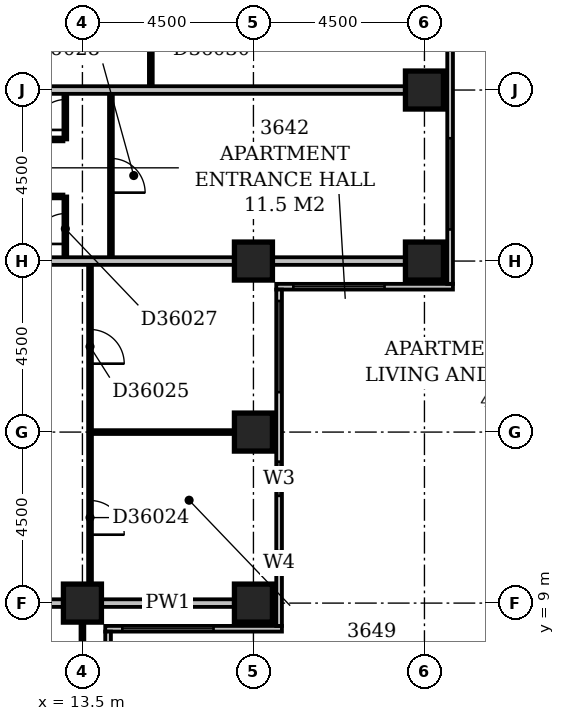
"""IFC4 building model, lengths in metres.
Left out: names, types, materials, properties, quantities, classifications, styles, units other than length and angle.
Written with IfcOpenShell. Run it as: python <this file> out.ifc"""

import sys

from ifc_helpers import new_model, si_unit, direction, frame, frame_2d, origin, origin_2d, place, context, subcontext, project, spatial, rectangle, extrude, element, fill, save


model = new_model("IFC4")
c1 = context("Model", 3, precision=1e-05, world=origin(), true_north=direction((0.0, 1.0)))
c2 = subcontext(c1, "Body", "Model", "MODEL_VIEW")
j1 = project(units=[si_unit("LENGTHUNIT", "METRE"), si_unit("PLANEANGLEUNIT", "RADIAN")], contexts=[c1])
p1 = place(None, origin())
s1 = spatial("IfcSite", under=j1, at=p1, CompositionType="ELEMENT")
p2 = place(p1, origin())
s2 = spatial("IfcBuilding", under=s1, at=p2, CompositionType="ELEMENT")
p3 = place(p2, frame((0.0, 0.0, 144.8)))
s3 = spatial("IfcBuildingStorey", under=s2, at=p3, CompositionType="ELEMENT", Elevation=144.8)
for number, where, z_axis, x_axis in (
    (1, (13.5, 9.0, -0.3), (0.0, 0.0, 1.0), (1.0, 0.0, 0.0)),
    (2, (18.0, 9.0, -0.3), (0.0, 0.0, 1.0), (1.0, 0.0, 0.0)),
    (3, (18.0, 13.5, -0.3), (0.0, 0.0, 1.0), (1.0, 0.0, 0.0)),
    (4, (18.0, 18.0, -0.3), (0.0, 0.0, 1.0), (1.0, 0.0, 0.0)),
    (5, (22.5, 18.0, -0.3), (0.0, 0.0, 1.0), (1.0, 0.0, 0.0)),
    (6, (22.5, 22.5, -0.3), (0.0, 0.0, 1.0), (1.0, 0.0, 0.0)),
):
    element("IfcColumn", number, at=place(p3, frame(where, z_axis=z_axis, x_axis=x_axis)), inside=s3, PredefinedType="COLUMN", context=c2, shape_type="SweptSolid", body=[
        extrude(rectangle(XDim=1.0, YDim=1.0, at=origin_2d()), origin(), (0.0, 0.0, 1.0), 3.6),
    ])
p4 = place(p3, frame((14.175, 3.9, 0.0), z_axis=(0.0, 0.0, 1.0), x_axis=(0.0, 1.0, 0.0)))
e7 = element("IfcWall", 7, at=p4, inside=s3, PredefinedType="STANDARD", context=c2, shape_type="SweptSolid", body=[
    extrude(rectangle(XDim=4.35, YDim=0.15, at=frame_2d((2.175, 0.0))), origin(), (0.0, 0.0, 1.0), 2.7),
])
p5 = place(p4, frame((1.65, 0.0, 0.6)))
e8 = element("IfcOpeningElement", 8, at=p5, cuts=e7, PredefinedType="OPENING", context=c2, shape_type="SweptSolid", body=[
    extrude(rectangle(XDim=2.4, YDim=1.8, at=frame_2d((1.2, 0.9))), frame((0.0, 0.087, 0.0), z_axis=(0.0, -1.0, 0.0), x_axis=(1.0, 0.0, 0.0)), (0.0, 0.0, 1.0), 0.174),
])
p6 = place(p3, frame((14.1, 8.325, 0.0), z_axis=(0.0, 0.0, 1.0), x_axis=(1.0, 0.0, 0.0)))
e9 = element("IfcWall", 9, at=p6, inside=s3, PredefinedType="STANDARD", context=c2, shape_type="SweptSolid", body=[
    extrude(rectangle(XDim=4.65, YDim=0.15, at=frame_2d((2.325, 0.0))), origin(), (0.0, 0.0, 1.0), 2.7),
])
p7 = place(p6, frame((0.45, 0.0, 0.6)))
e10 = element("IfcOpeningElement", 10, at=p7, cuts=e9, PredefinedType="OPENING", context=c2, shape_type="SweptSolid", body=[
    extrude(rectangle(XDim=2.4, YDim=1.8, at=frame_2d((1.2, 0.9))), frame((0.0, 0.087, 0.0), z_axis=(0.0, -1.0, 0.0), x_axis=(1.0, 0.0, 0.0)), (0.0, 0.0, 1.0), 0.174),
])
p8 = place(p3, frame((18.675, 8.4, 0.0), z_axis=(0.0, 0.0, 1.0), x_axis=(0.0, 1.0, 0.0)))
e11 = element("IfcWall", 11, at=p8, inside=s3, PredefinedType="STANDARD", context=c2, shape_type="SweptSolid", body=[
    extrude(rectangle(XDim=8.85, YDim=0.15, at=frame_2d((4.425, 0.0))), origin(), (0.0, 0.0, 1.0), 2.7),
])
p9 = place(p8, frame((1.368, 0.0, 0.6)))
e12 = element("IfcOpeningElement", 12, at=p9, cuts=e11, PredefinedType="OPENING", context=c2, shape_type="SweptSolid", body=[
    extrude(rectangle(XDim=0.6, YDim=1.8, at=frame_2d((0.3, 0.9))), frame((0.0, 0.087, 0.0), z_axis=(0.0, -1.0, 0.0), x_axis=(1.0, 0.0, 0.0)), (0.0, 0.0, 1.0), 0.174),
])
p10 = place(p8, frame((3.422, 0.0, 0.6)))
e13 = element("IfcOpeningElement", 13, at=p10, cuts=e11, PredefinedType="OPENING", context=c2, shape_type="SweptSolid", body=[
    extrude(rectangle(XDim=0.9, YDim=1.8, at=frame_2d((0.45, 0.9))), frame((0.0, 0.087, 0.0), z_axis=(0.0, -1.0, 0.0), x_axis=(1.0, 0.0, 0.0)), (0.0, 0.0, 1.0), 0.174),
])
p11 = place(p8, frame((6.15, 0.0, 0.6)))
e14 = element("IfcOpeningElement", 14, at=p11, cuts=e11, PredefinedType="OPENING", context=c2, shape_type="SweptSolid", body=[
    extrude(rectangle(XDim=2.4, YDim=1.8, at=frame_2d((1.2, 0.9))), frame((0.0, 0.087, 0.0), z_axis=(0.0, -1.0, 0.0), x_axis=(1.0, 0.0, 0.0)), (0.0, 0.0, 1.0), 0.174),
])
p12 = place(p3, frame((18.6, 17.325, 0.0), z_axis=(0.0, 0.0, 1.0), x_axis=(1.0, 0.0, 0.0)))
e15 = element("IfcWall", 15, at=p12, inside=s3, PredefinedType="STANDARD", context=c2, shape_type="SweptSolid", body=[
    extrude(rectangle(XDim=4.65, YDim=0.15, at=frame_2d((2.325, 0.0))), origin(), (0.0, 0.0, 1.0), 2.7),
])
p13 = place(p12, frame((0.45, 0.0, 0.6)))
e16 = element("IfcOpeningElement", 16, at=p13, cuts=e15, PredefinedType="OPENING", context=c2, shape_type="SweptSolid", body=[
    extrude(rectangle(XDim=2.4, YDim=1.8, at=frame_2d((1.2, 0.9))), frame((0.0, 0.087, 0.0), z_axis=(0.0, -1.0, 0.0), x_axis=(1.0, 0.0, 0.0)), (0.0, 0.0, 1.0), 0.174),
])
p14 = place(p3, frame((23.175, 17.4, 0.0), z_axis=(0.0, 0.0, 1.0), x_axis=(0.0, 1.0, 0.0)))
e17 = element("IfcWall", 17, at=p14, inside=s3, PredefinedType="STANDARD", context=c2, shape_type="SweptSolid", body=[
    extrude(rectangle(XDim=17.85, YDim=0.15, at=frame_2d((8.925, 0.0))), origin(), (0.0, 0.0, 1.0), 2.7),
])
p15 = place(p14, frame((1.432, 0.0, 0.6)))
e18 = element("IfcOpeningElement", 18, at=p15, cuts=e17, PredefinedType="OPENING", context=c2, shape_type="SweptSolid", body=[
    extrude(rectangle(XDim=2.4, YDim=1.8, at=frame_2d((1.2, 0.9))), frame((0.0, 0.087, 0.0), z_axis=(0.0, -1.0, 0.0), x_axis=(1.0, 0.0, 0.0)), (0.0, 0.0, 1.0), 0.174),
])
p16 = place(p14, frame((6.15, 0.0, 0.6)))
e19 = element("IfcOpeningElement", 19, at=p16, cuts=e17, PredefinedType="OPENING", context=c2, shape_type="SweptSolid", body=[
    extrude(rectangle(XDim=2.4, YDim=1.8, at=frame_2d((1.2, 0.9))), frame((0.0, 0.087, 0.0), z_axis=(0.0, -1.0, 0.0), x_axis=(1.0, 0.0, 0.0)), (0.0, 0.0, 1.0), 0.174),
])
p17 = place(p14, frame((10.65, 0.0, 0.6)))
e20 = element("IfcOpeningElement", 20, at=p17, cuts=e17, PredefinedType="OPENING", context=c2, shape_type="SweptSolid", body=[
    extrude(rectangle(XDim=2.4, YDim=1.8, at=frame_2d((1.2, 0.9))), frame((0.0, 0.087, 0.0), z_axis=(0.0, -1.0, 0.0), x_axis=(1.0, 0.0, 0.0)), (0.0, 0.0, 1.0), 0.174),
])
p18 = place(p14, frame((15.15, 0.0, 0.6)))
e21 = element("IfcOpeningElement", 21, at=p18, cuts=e17, PredefinedType="OPENING", context=c2, shape_type="SweptSolid", body=[
    extrude(rectangle(XDim=2.4, YDim=1.8, at=frame_2d((1.2, 0.9))), frame((0.0, 0.087, 0.0), z_axis=(0.0, -1.0, 0.0), x_axis=(1.0, 0.0, 0.0)), (0.0, 0.0, 1.0), 0.174),
])
p19 = place(p3, frame((13.5, 5.0, 0.0), z_axis=(0.0, 0.0, 1.0), x_axis=(0.0, 1.0, 0.0)))
e22 = element("IfcWall", 22, at=p19, inside=s3, PredefinedType="PARTITIONING", context=c2, shape_type="SweptSolid", body=[
    extrude(rectangle(XDim=3.5, YDim=0.1, at=frame_2d((1.75, 0.0))), origin(), (0.0, 0.0, 1.0), 2.7),
])
p20 = place(p3, frame((9.1, 9.0, 0.0), z_axis=(0.0, 0.0, 1.0), x_axis=(1.0, 0.0, 0.0)))
e23 = element("IfcWall", 23, at=p20, inside=s3, PredefinedType="PARTITIONING", context=c2, shape_type="SweptSolid", body=[
    extrude(rectangle(XDim=3.9, YDim=0.2, at=frame_2d((1.95, 0.0))), origin(), (0.0, 0.0, 1.0), 3.3),
])
p21 = place(p3, frame((14.0, 9.0, 0.0), z_axis=(0.0, 0.0, 1.0), x_axis=(1.0, 0.0, 0.0)))
e24 = element("IfcWall", 24, at=p21, inside=s3, PredefinedType="PARTITIONING", context=c2, shape_type="SweptSolid", body=[
    extrude(rectangle(XDim=3.5, YDim=0.2, at=frame_2d((1.75, 0.0))), origin(), (0.0, 0.0, 1.0), 2.7),
])
p22 = place(p3, frame((13.7, 9.5, 0.0), z_axis=(0.0, 0.0, 1.0), x_axis=(0.0, 1.0, 0.0)))
e25 = element("IfcWall", 25, at=p22, inside=s3, PredefinedType="PARTITIONING", context=c2, shape_type="SweptSolid", body=[
    extrude(rectangle(XDim=8.4, YDim=0.1, at=frame_2d((4.2, 0.0))), origin(), (0.0, 0.0, 1.0), 3.3),
])
p23 = place(p22, frame((1.3, 0.0, 0.0)))
e26 = element("IfcOpeningElement", 26, at=p23, cuts=e25, PredefinedType="OPENING", context=c2, shape_type="SweptSolid", body=[
    extrude(rectangle(XDim=0.9, YDim=2.1, at=frame_2d((0.45, 1.05))), frame((0.0, 0.062, 0.0), z_axis=(0.0, -1.0, 0.0), x_axis=(1.0, 0.0, 0.0)), (0.0, 0.0, 1.0), 0.124),
])
p24 = place(p22, frame((5.8, 0.0, 0.0)))
e27 = element("IfcOpeningElement", 27, at=p24, cuts=e25, PredefinedType="OPENING", context=c2, shape_type="SweptSolid", body=[
    extrude(rectangle(XDim=0.9, YDim=2.1, at=frame_2d((0.45, 1.05))), frame((0.0, 0.062, 0.0), z_axis=(0.0, -1.0, 0.0), x_axis=(1.0, 0.0, 0.0)), (0.0, 0.0, 1.0), 0.124),
])
p25 = place(p3, frame((13.75, 13.5, 0.0), z_axis=(0.0, 0.0, 1.0), x_axis=(1.0, 0.0, 0.0)))
e28 = element("IfcWall", 28, at=p25, inside=s3, PredefinedType="PARTITIONING", context=c2, shape_type="SweptSolid", body=[
    extrude(rectangle(XDim=3.75, YDim=0.1, at=frame_2d((1.875, 0.0))), origin(), (0.0, 0.0, 1.0), 3.3),
])
p26 = place(p3, frame((9.1, 18.0, 0.0), z_axis=(0.0, 0.0, 1.0), x_axis=(1.0, 0.0, 0.0)))
e29 = element("IfcWall", 29, at=p26, inside=s3, PredefinedType="PARTITIONING", context=c2, shape_type="SweptSolid", body=[
    extrude(rectangle(XDim=8.4, YDim=0.2, at=frame_2d((4.2, 0.0))), origin(), (0.0, 0.0, 1.0), 2.6),
])
p27 = place(p3, frame((18.5, 18.0, 0.0), z_axis=(0.0, 0.0, 1.0), x_axis=(1.0, 0.0, 0.0)))
e30 = element("IfcWall", 30, at=p27, inside=s3, PredefinedType="PARTITIONING", context=c2, shape_type="SweptSolid", body=[
    extrude(rectangle(XDim=3.5, YDim=0.2, at=frame_2d((1.75, 0.0))), origin(), (0.0, 0.0, 1.0), 2.7),
])
p28 = place(p3, frame((13.05, 18.1, 0.0), z_axis=(0.0, 0.0, 1.0), x_axis=(0.0, 1.0, 0.0)))
e31 = element("IfcWall", 31, at=p28, inside=s3, PredefinedType="PARTITIONING", context=c2, shape_type="SweptSolid", body=[
    extrude(rectangle(XDim=1.6, YDim=0.1, at=frame_2d((0.8, 0.0))), origin(), (0.0, 0.0, 1.0), 3.3),
])
p29 = place(p28, frame((0.35, 0.0, 0.0)))
e32 = element("IfcOpeningElement", 32, at=p29, cuts=e31, PredefinedType="OPENING", context=c2, shape_type="SweptSolid", body=[
    extrude(rectangle(XDim=0.8, YDim=2.1, at=frame_2d((0.4, 1.05))), frame((0.0, 0.062, 0.0), z_axis=(0.0, -1.0, 0.0), x_axis=(1.0, 0.0, 0.0)), (0.0, 0.0, 1.0), 0.124),
])
p30 = place(p3, frame((14.25, 18.1, 0.0), z_axis=(0.0, 0.0, 1.0), x_axis=(0.0, 1.0, 0.0)))
e33 = element("IfcWall", 33, at=p30, inside=s3, PredefinedType="PARTITIONING", context=c2, shape_type="SweptSolid", body=[
    extrude(rectangle(XDim=4.3, YDim=0.1, at=frame_2d((2.15, 0.0))), origin(), (0.0, 0.0, 1.0), 3.3),
])
p31 = place(p30, frame((1.7, 0.0, 0.0)))
e34 = element("IfcOpeningElement", 34, at=p31, cuts=e33, PredefinedType="OPENING", context=c2, shape_type="SweptSolid", body=[
    extrude(rectangle(XDim=0.9, YDim=2.1, at=frame_2d((0.45, 1.05))), frame((0.0, 0.062, 0.0), z_axis=(0.0, -1.0, 0.0), x_axis=(1.0, 0.0, 0.0)), (0.0, 0.0, 1.0), 0.124),
])
p32 = place(p3, frame((9.1, 19.7, 0.0), z_axis=(0.0, 0.0, 1.0), x_axis=(1.0, 0.0, 0.0)))
e35 = element("IfcWall", 35, at=p32, inside=s3, PredefinedType="PLUMBINGWALL", context=c2, shape_type="SweptSolid", body=[
    extrude(rectangle(XDim=3.9, YDim=0.1, at=frame_2d((1.95, 0.0))), origin(), (0.0, 0.0, 1.0), 3.3),
])
p33 = place(p3, frame((9.1, 21.2, 0.0), z_axis=(0.0, 0.0, 1.0), x_axis=(1.0, 0.0, 0.0)))
e36 = element("IfcWall", 36, at=p33, inside=s3, PredefinedType="PARTITIONING", context=c2, shape_type="SweptSolid", body=[
    extrude(rectangle(XDim=3.9, YDim=0.1, at=frame_2d((1.95, 0.0))), origin(), (0.0, 0.0, 1.0), 3.3),
])
p34 = place(p3, frame((13.05, 21.2, 0.0), z_axis=(0.0, 0.0, 1.0), x_axis=(0.0, 1.0, 0.0)))
e37 = element("IfcWall", 37, at=p34, inside=s3, PredefinedType="PARTITIONING", context=c2, shape_type="SweptSolid", body=[
    extrude(rectangle(XDim=1.2, YDim=0.1, at=frame_2d((0.6, 0.0))), origin(), (0.0, 0.0, 1.0), 3.3),
])
p35 = place(p34, frame((0.25, 0.0, 0.0)))
e38 = element("IfcOpeningElement", 38, at=p35, cuts=e37, PredefinedType="OPENING", context=c2, shape_type="SweptSolid", body=[
    extrude(rectangle(XDim=0.8, YDim=2.1, at=frame_2d((0.4, 1.05))), frame((0.0, 0.062, 0.0), z_axis=(0.0, -1.0, 0.0), x_axis=(1.0, 0.0, 0.0)), (0.0, 0.0, 1.0), 0.124),
])
p36 = place(p3, frame((9.1, 22.5, 0.0), z_axis=(0.0, 0.0, 1.0), x_axis=(1.0, 0.0, 0.0)))
e39 = element("IfcWall", 39, at=p36, inside=s3, PredefinedType="PARTITIONING", context=c2, shape_type="SweptSolid", body=[
    extrude(rectangle(XDim=12.9, YDim=0.2, at=frame_2d((6.45, 0.0))), origin(), (0.0, 0.0, 1.0), 3.3),
])
p37 = place(p3, frame((15.3, 22.6, 0.0), z_axis=(0.0, 0.0, 1.0), x_axis=(0.0, 1.0, 0.0)))
e40 = element("IfcWall", 40, at=p37, inside=s3, PredefinedType="PARTITIONING", context=c2, shape_type="SweptSolid", body=[
    extrude(rectangle(XDim=8.8, YDim=0.1, at=frame_2d((4.4, 0.0))), origin(), (0.0, 0.0, 1.0), 3.3),
])
p38 = place(p37, frame((1.7, 0.0, 0.0)))
e41 = element("IfcOpeningElement", 41, at=p38, cuts=e40, PredefinedType="OPENING", context=c2, shape_type="SweptSolid", body=[
    extrude(rectangle(XDim=0.9, YDim=2.1, at=frame_2d((0.45, 1.05))), frame((0.0, 0.062, 0.0), z_axis=(0.0, -1.0, 0.0), x_axis=(1.0, 0.0, 0.0)), (0.0, 0.0, 1.0), 0.124),
])
p39 = place(p37, frame((6.2, 0.0, 0.0)))
e42 = element("IfcOpeningElement", 42, at=p39, cuts=e40, PredefinedType="OPENING", context=c2, shape_type="SweptSolid", body=[
    extrude(rectangle(XDim=0.9, YDim=2.1, at=frame_2d((0.45, 1.05))), frame((0.0, 0.062, 0.0), z_axis=(0.0, -1.0, 0.0), x_axis=(1.0, 0.0, 0.0)), (0.0, 0.0, 1.0), 0.124),
])
p40 = place(p7, origin())
e43 = element("IfcWindow", 43, at=p40, inside=s3, PartitioningType="SINGLE_PANEL", PredefinedType="WINDOW", context=c2, shape_type="SweptSolid", body=[
    extrude(rectangle(XDim=2.4, YDim=1.8, at=frame_2d((1.2, 0.9))), frame((0.0, 0.03, 0.0), z_axis=(0.0, -1.0, 0.0), x_axis=(1.0, 0.0, 0.0)), (0.0, 0.0, 1.0), 0.06),
])
fill(e10, e43)
p41 = place(p9, origin())
e44 = element("IfcWindow", 44, at=p41, inside=s3, PartitioningType="SINGLE_PANEL", PredefinedType="WINDOW", context=c2, shape_type="SweptSolid", body=[
    extrude(rectangle(XDim=0.6, YDim=1.8, at=frame_2d((0.3, 0.9))), frame((0.0, 0.03, 0.0), z_axis=(0.0, -1.0, 0.0), x_axis=(1.0, 0.0, 0.0)), (0.0, 0.0, 1.0), 0.06),
])
fill(e12, e44)
p42 = place(p10, origin())
e45 = element("IfcWindow", 45, at=p42, inside=s3, PartitioningType="SINGLE_PANEL", PredefinedType="WINDOW", context=c2, shape_type="SweptSolid", body=[
    extrude(rectangle(XDim=0.9, YDim=1.8, at=frame_2d((0.45, 0.9))), frame((0.0, 0.03, 0.0), z_axis=(0.0, -1.0, 0.0), x_axis=(1.0, 0.0, 0.0)), (0.0, 0.0, 1.0), 0.06),
])
fill(e13, e45)
p43 = place(p11, origin())
e46 = element("IfcWindow", 46, at=p43, inside=s3, PartitioningType="SINGLE_PANEL", PredefinedType="WINDOW", context=c2, shape_type="SweptSolid", body=[
    extrude(rectangle(XDim=2.4, YDim=1.8, at=frame_2d((1.2, 0.9))), frame((0.0, 0.03, 0.0), z_axis=(0.0, -1.0, 0.0), x_axis=(1.0, 0.0, 0.0)), (0.0, 0.0, 1.0), 0.06),
])
fill(e14, e46)
p44 = place(p13, origin())
e47 = element("IfcWindow", 47, at=p44, inside=s3, PartitioningType="SINGLE_PANEL", PredefinedType="WINDOW", context=c2, shape_type="SweptSolid", body=[
    extrude(rectangle(XDim=2.4, YDim=1.8, at=frame_2d((1.2, 0.9))), frame((0.0, 0.03, 0.0), z_axis=(0.0, -1.0, 0.0), x_axis=(1.0, 0.0, 0.0)), (0.0, 0.0, 1.0), 0.06),
])
fill(e16, e47)
p45 = place(p15, origin())
e48 = element("IfcWindow", 48, at=p45, inside=s3, PartitioningType="SINGLE_PANEL", PredefinedType="WINDOW", context=c2, shape_type="SweptSolid", body=[
    extrude(rectangle(XDim=2.4, YDim=1.8, at=frame_2d((1.2, 0.9))), frame((0.0, 0.03, 0.0), z_axis=(0.0, -1.0, 0.0), x_axis=(1.0, 0.0, 0.0)), (0.0, 0.0, 1.0), 0.06),
])
fill(e18, e48)
p46 = place(p23, frame((0.9, 0.0, 0.0), z_axis=(0.0, 0.0, 1.0), x_axis=(-1.0, 0.0, 0.0)))
e49 = element("IfcDoor", 49, at=p46, inside=s3, OperationType="SINGLE_SWING_RIGHT", PredefinedType="DOOR", context=c2, shape_type="SweptSolid", body=[
    extrude(rectangle(XDim=0.9, YDim=2.1, at=frame_2d((0.45, 1.05))), frame((0.0, 0.025, 0.0), z_axis=(0.0, -1.0, 0.0), x_axis=(1.0, 0.0, 0.0)), (0.0, 0.0, 1.0), 0.05),
])
fill(e26, e49)
p47 = place(p24, frame((0.9, 0.0, 0.0), z_axis=(0.0, 0.0, 1.0), x_axis=(-1.0, 0.0, 0.0)))
e50 = element("IfcDoor", 50, at=p47, inside=s3, OperationType="SINGLE_SWING_RIGHT", PredefinedType="DOOR", context=c2, shape_type="SweptSolid", body=[
    extrude(rectangle(XDim=0.9, YDim=2.1, at=frame_2d((0.45, 1.05))), frame((0.0, 0.025, 0.0), z_axis=(0.0, -1.0, 0.0), x_axis=(1.0, 0.0, 0.0)), (0.0, 0.0, 1.0), 0.05),
])
fill(e27, e50)
p48 = place(p29, origin())
e51 = element("IfcDoor", 51, at=p48, inside=s3, OperationType="SINGLE_SWING_LEFT", PredefinedType="DOOR", context=c2, shape_type="SweptSolid", body=[
    extrude(rectangle(XDim=0.8, YDim=2.1, at=frame_2d((0.4, 1.05))), frame((0.0, 0.025, 0.0), z_axis=(0.0, -1.0, 0.0), x_axis=(1.0, 0.0, 0.0)), (0.0, 0.0, 1.0), 0.05),
])
fill(e32, e51)
p49 = place(p31, frame((0.9, 0.0, 0.0), z_axis=(0.0, 0.0, 1.0), x_axis=(-1.0, 0.0, 0.0)))
e52 = element("IfcDoor", 52, at=p49, inside=s3, OperationType="SINGLE_SWING_RIGHT", PredefinedType="DOOR", context=c2, shape_type="SweptSolid", body=[
    extrude(rectangle(XDim=0.9, YDim=2.1, at=frame_2d((0.45, 1.05))), frame((0.0, 0.025, 0.0), z_axis=(0.0, -1.0, 0.0), x_axis=(1.0, 0.0, 0.0)), (0.0, 0.0, 1.0), 0.05),
])
fill(e34, e52)
p50 = place(p35, origin())
e53 = element("IfcDoor", 53, at=p50, inside=s3, OperationType="SINGLE_SWING_LEFT", PredefinedType="DOOR", context=c2, shape_type="SweptSolid", body=[
    extrude(rectangle(XDim=0.8, YDim=2.1, at=frame_2d((0.4, 1.05))), frame((0.0, 0.025, 0.0), z_axis=(0.0, -1.0, 0.0), x_axis=(1.0, 0.0, 0.0)), (0.0, 0.0, 1.0), 0.05),
])
fill(e38, e53)
save(model, sys.argv[1])
